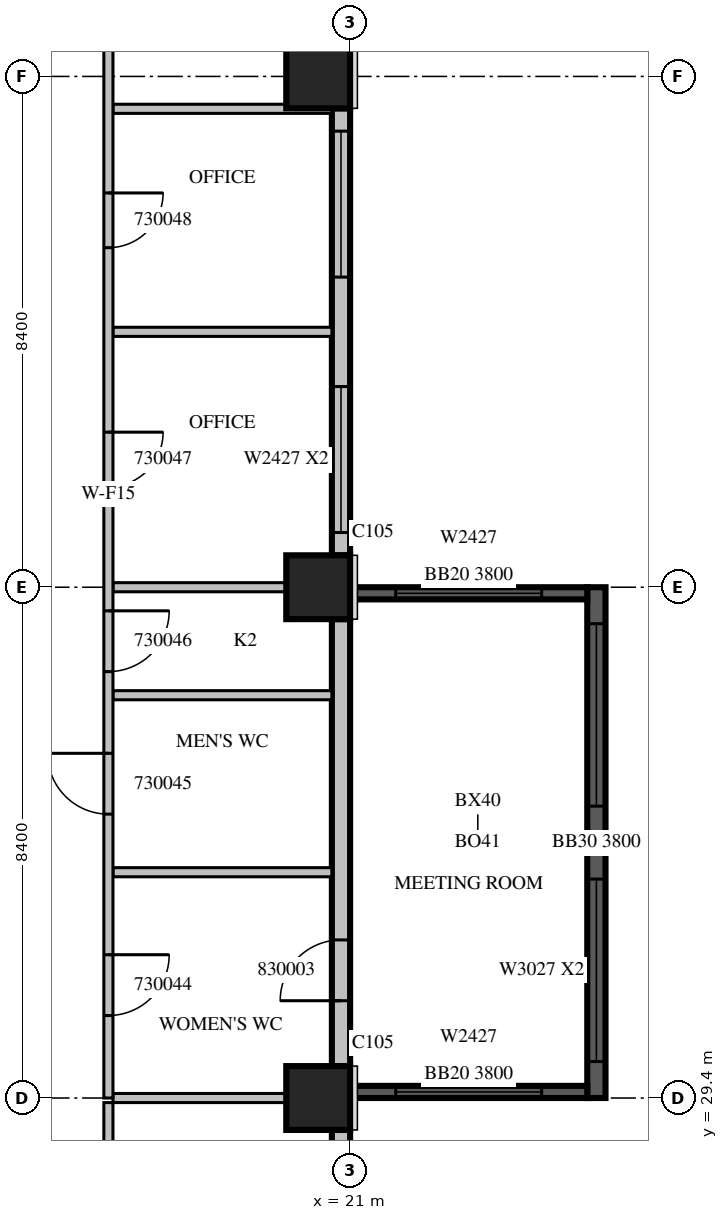
"""IFC4 building model, lengths in metres.
Left out: names, types, materials, properties, quantities, classifications, styles, units other than length and angle.
Written with IfcOpenShell. Run it as: python <this file> out.ifc"""

import sys

from ifc_helpers import new_model, si_unit, direction, frame, frame_2d, origin, origin_2d, place, context, subcontext, project, spatial, rectangle, extrude, source, transform, mapped, element, fill, save


model = new_model("IFC4")
c1 = context("Model", 3, precision=1e-05, world=origin(), true_north=direction((0.0, 1.0)))
c2 = subcontext(c1, "Body", "Model", "MODEL_VIEW")
j1 = project(units=[si_unit("LENGTHUNIT", "METRE"), si_unit("PLANEANGLEUNIT", "RADIAN")], contexts=[c1])
p1 = place(None, origin())
s1 = spatial("IfcSite", under=j1, at=p1, CompositionType="ELEMENT")
p2 = place(p1, origin())
s2 = spatial("IfcBuilding", under=s1, at=p2, CompositionType="ELEMENT")
p3 = place(p2, frame((0.0, 0.0, 137.1)))
s3 = spatial("IfcBuildingStorey", under=s2, at=p3, CompositionType="ELEMENT", Elevation=137.1)
m1 = source(origin(), c2, "Body", "SweptSolid", [
    extrude(rectangle(XDim=1.05, YDim=1.05, at=origin_2d()), origin(), (0.0, 0.0, 1.0), 4.2),
])
for number, where, z_axis, x_axis in (
    (1, (20.475, 29.4, 0.0), (0.0, 0.0, 1.0), (1.0, 0.0, 0.0)),
    (2, (20.475, 37.8, 0.0), (0.0, 0.0, 1.0), (1.0, 0.0, 0.0)),
    (3, (20.475, 46.2, 0.0), (0.0, 0.0, 1.0), (1.0, 0.0, 0.0)),
):
    element("IfcColumn", number, at=place(p3, frame(where, z_axis=z_axis, x_axis=x_axis)), inside=s3, PredefinedType="COLUMN", context=c2, shape_type="MappedRepresentation", body=[
        mapped(m1, transform((0.0, 0.0, 0.0), scale=1.0)),
    ])
m2 = source(origin(), c2, "Body", "SweptSolid", [
    extrude(rectangle(XDim=8.4, YDim=0.3, at=frame_2d((4.2, 0.0))), origin(), (0.0, 0.0, 1.0), 3.8),
])
p4 = place(p3, frame((25.05, 29.4, 0.0), z_axis=(0.0, 0.0, 1.0), x_axis=(0.0, 1.0, 0.0)))
e4 = element("IfcWall", 4, at=p4, inside=s3, PredefinedType="SOLIDWALL", context=c2, shape_type="MappedRepresentation", body=[
    mapped(m2, transform((0.0, 0.0, 0.0), scale=1.0)),
])
m3 = source(origin(), c2, "Body", "SweptSolid", [
    extrude(rectangle(XDim=3.0, YDim=2.7, at=frame_2d((1.5, 1.35))), frame((0.0, 0.16, 0.0), z_axis=(0.0, -1.0, 0.0), x_axis=(1.0, 0.0, 0.0)), (0.0, 0.0, 1.0), 0.32),
])
p5 = place(p4, frame((0.6, 0.0, 0.6)))
e5 = element("IfcOpeningElement", 5, at=p5, cuts=e4, PredefinedType="OPENING", context=c2, shape_type="MappedRepresentation", body=[
    mapped(m3, transform((0.0, 0.0, 0.0), scale=1.0)),
])
p6 = place(p4, frame((4.8, 0.0, 0.6)))
e6 = element("IfcOpeningElement", 6, at=p6, cuts=e4, PredefinedType="OPENING", context=c2, shape_type="MappedRepresentation", body=[
    mapped(m3, transform((0.0, 0.0, 0.0), scale=1.0)),
])
m4 = source(origin(), c2, "Body", "SweptSolid", [
    extrude(rectangle(XDim=3.9, YDim=0.2, at=frame_2d((1.95, 0.0))), origin(), (0.0, 0.0, 1.0), 3.8),
])
p7 = place(p3, frame((21.0, 29.5, 0.0), z_axis=(0.0, 0.0, 1.0), x_axis=(1.0, 0.0, 0.0)))
e7 = element("IfcWall", 7, at=p7, inside=s3, PredefinedType="SOLIDWALL", context=c2, shape_type="MappedRepresentation", body=[
    mapped(m4, transform((0.0, 0.0, 0.0), scale=1.0)),
])
m5 = source(origin(), c2, "Body", "SweptSolid", [
    extrude(rectangle(XDim=2.4, YDim=2.7, at=frame_2d((1.2, 1.35))), frame((0.0, 0.11, 0.0), z_axis=(0.0, -1.0, 0.0), x_axis=(1.0, 0.0, 0.0)), (0.0, 0.0, 1.0), 0.22),
])
p8 = place(p7, frame((0.75, 0.0, 0.6)))
e8 = element("IfcOpeningElement", 8, at=p8, cuts=e7, PredefinedType="OPENING", context=c2, shape_type="MappedRepresentation", body=[
    mapped(m5, transform((0.0, 0.0, 0.0), scale=1.0)),
])
p9 = place(p3, frame((21.0, 37.7, 0.0), z_axis=(0.0, 0.0, 1.0), x_axis=(1.0, 0.0, 0.0)))
e9 = element("IfcWall", 9, at=p9, inside=s3, PredefinedType="SOLIDWALL", context=c2, shape_type="MappedRepresentation", body=[
    mapped(m4, transform((0.0, 0.0, 0.0), scale=1.0)),
])
p10 = place(p9, frame((0.75, 0.0, 0.6)))
e10 = element("IfcOpeningElement", 10, at=p10, cuts=e9, PredefinedType="OPENING", context=c2, shape_type="MappedRepresentation", body=[
    mapped(m5, transform((0.0, 0.0, 0.0), scale=1.0)),
])
m6 = source(origin(), c2, "Body", "SweptSolid", [
    extrude(rectangle(XDim=6.875, YDim=0.3, at=frame_2d((3.438, 0.0))), origin(), (0.0, 0.0, 1.0), 3.8),
])
p11 = place(p3, frame((20.85, 22.0, 0.0), z_axis=(0.0, 0.0, 1.0), x_axis=(0.0, 1.0, 0.0)))
e11 = element("IfcWall", 11, at=p11, inside=s3, PredefinedType="STANDARD", context=c2, shape_type="MappedRepresentation", body=[
    mapped(m6, transform((0.0, 0.0, 0.0), scale=1.0)),
])
m7 = source(origin(), c2, "Body", "SweptSolid", [
    extrude(rectangle(XDim=1.8, YDim=2.7, at=frame_2d((0.9, 1.35))), frame((0.0, 0.16, 0.0), z_axis=(0.0, -1.0, 0.0), x_axis=(1.0, 0.0, 0.0)), (0.0, 0.0, 1.0), 0.32),
])
p12 = place(p11, frame((0.2, 0.0, 0.6)))
e12 = element("IfcOpeningElement", 12, at=p12, cuts=e11, PredefinedType="OPENING", context=c2, shape_type="MappedRepresentation", body=[
    mapped(m7, transform((0.0, 0.0, 0.0), scale=1.0)),
])
p13 = place(p11, frame((4.537, 0.0, 0.6)))
e13 = element("IfcOpeningElement", 13, at=p13, cuts=e11, PredefinedType="OPENING", context=c2, shape_type="MappedRepresentation", body=[
    mapped(m7, transform((0.0, 0.0, 0.0), scale=1.0)),
])
m8 = source(origin(), c2, "Body", "SweptSolid", [
    extrude(rectangle(XDim=7.35, YDim=0.3, at=frame_2d((3.675, 0.0))), origin(), (0.0, 0.0, 1.0), 3.8),
])
p14 = place(p3, frame((20.85, 29.925, 0.0), z_axis=(0.0, 0.0, 1.0), x_axis=(0.0, 1.0, 0.0)))
e14 = element("IfcWall", 14, at=p14, inside=s3, PredefinedType="STANDARD", context=c2, shape_type="MappedRepresentation", body=[
    mapped(m8, transform((0.0, 0.0, 0.0), scale=1.0)),
])
m9 = source(origin(), c2, "Body", "SweptSolid", [
    extrude(rectangle(XDim=1.0, YDim=2.1, at=frame_2d((0.5, 1.05))), frame((0.0, 0.16, 0.0), z_axis=(0.0, -1.0, 0.0), x_axis=(1.0, 0.0, 0.0)), (0.0, 0.0, 1.0), 0.32),
])
p15 = place(p14, frame((1.075, 0.0, 0.0)))
e15 = element("IfcOpeningElement", 15, at=p15, cuts=e14, PredefinedType="OPENING", context=c2, shape_type="MappedRepresentation", body=[
    mapped(m9, transform((0.0, 0.0, 0.0), scale=1.0)),
])
p16 = place(p3, frame((20.85, 38.325, 0.0), z_axis=(0.0, 0.0, 1.0), x_axis=(0.0, 1.0, 0.0)))
e16 = element("IfcWall", 16, at=p16, inside=s3, PredefinedType="STANDARD", context=c2, shape_type="MappedRepresentation", body=[
    mapped(m8, transform((0.0, 0.0, 0.0), scale=1.0)),
])
m10 = source(origin(), c2, "Body", "SweptSolid", [
    extrude(rectangle(XDim=2.4, YDim=2.7, at=frame_2d((1.2, 1.35))), frame((0.0, 0.16, 0.0), z_axis=(0.0, -1.0, 0.0), x_axis=(1.0, 0.0, 0.0)), (0.0, 0.0, 1.0), 0.32),
])
p17 = place(p16, frame((0.375, 0.0, 0.6)))
e17 = element("IfcOpeningElement", 17, at=p17, cuts=e16, PredefinedType="OPENING", context=c2, shape_type="MappedRepresentation", body=[
    mapped(m10, transform((0.0, 0.0, 0.0), scale=1.0)),
])
p18 = place(p16, frame((4.575, 0.0, 0.6)))
e18 = element("IfcOpeningElement", 18, at=p18, cuts=e16, PredefinedType="OPENING", context=c2, shape_type="MappedRepresentation", body=[
    mapped(m10, transform((0.0, 0.0, 0.0), scale=1.0)),
])
m11 = source(origin(), c2, "Body", "SweptSolid", [
    extrude(rectangle(XDim=3.05, YDim=0.15, at=frame_2d((1.525, 0.0))), origin(), (0.0, 0.0, 1.0), 3.8),
])
p19 = place(p3, frame((17.025, 29.325, 0.0), z_axis=(0.0, 0.0, 1.0), x_axis=(0.0, -1.0, 0.0)))
e19 = element("IfcWall", 19, at=p19, inside=s3, PredefinedType="PARTITIONING", context=c2, shape_type="MappedRepresentation", body=[
    mapped(m11, transform((0.0, 0.0, 0.0), scale=1.0)),
])
m12 = source(origin(), c2, "Body", "SweptSolid", [
    extrude(rectangle(XDim=2.851, YDim=0.15, at=frame_2d((1.425, 0.0))), origin(), (0.0, 0.0, 1.0), 3.8),
])
p20 = place(p3, frame((19.951, 29.4, 0.0), z_axis=(0.0, 0.0, 1.0), x_axis=(-1.0, 0.0, 0.0)))
e20 = element("IfcWall", 20, at=p20, inside=s3, PredefinedType="PARTITIONING", context=c2, shape_type="MappedRepresentation", body=[
    mapped(m12, transform((0.0, 0.0, 0.0), scale=1.0)),
])
m13 = source(origin(), c2, "Body", "SweptSolid", [
    extrude(rectangle(XDim=3.6, YDim=0.15, at=frame_2d((1.8, 0.0))), origin(), (0.0, 0.0, 1.0), 3.8),
])
for number, where, z_axis, x_axis in (
    (21, (17.1, 33.113, 0.0), (0.0, 0.0, 1.0), (1.0, 0.0, 0.0)),
    (22, (17.1, 36.024, 0.0), (0.0, 0.0, 1.0), (1.0, 0.0, 0.0)),
    (23, (17.1, 45.667, 0.0), (0.0, 0.0, 1.0), (1.0, 0.0, 0.0)),
):
    element("IfcWall", number, at=place(p3, frame(where, z_axis=z_axis, x_axis=x_axis)), inside=s3, PredefinedType="PARTITIONING", context=c2, shape_type="MappedRepresentation", body=[
        mapped(m13, transform((0.0, 0.0, 0.0), scale=1.0)),
    ])
p21 = place(p3, frame((19.951, 37.8, 0.0), z_axis=(0.0, 0.0, 1.0), x_axis=(-1.0, 0.0, 0.0)))
e24 = element("IfcWall", 24, at=p21, inside=s3, PredefinedType="PARTITIONING", context=c2, shape_type="MappedRepresentation", body=[
    mapped(m12, transform((0.0, 0.0, 0.0), scale=1.0)),
])
p22 = place(p3, frame((20.7, 42.0, 0.0), z_axis=(0.0, 0.0, 1.0), x_axis=(-1.0, 0.0, 0.0)))
e25 = element("IfcWall", 25, at=p22, inside=s3, PredefinedType="PARTITIONING", context=c2, shape_type="MappedRepresentation", body=[
    mapped(m13, transform((0.0, 0.0, 0.0), scale=1.0)),
])
m14 = source(origin(), c2, "Body", "SweptSolid", [
    extrude(rectangle(XDim=19.86, YDim=0.15, at=frame_2d((9.93, 0.0))), origin(), (0.0, 0.0, 1.0), 3.8),
])
p23 = place(p3, frame((17.025, 49.26, 0.0), z_axis=(0.0, 0.0, 1.0), x_axis=(0.0, -1.0, 0.0)))
e26 = element("IfcWall", 26, at=p23, inside=s3, PredefinedType="PARTITIONING", context=c2, shape_type="MappedRepresentation", body=[
    mapped(m14, transform((0.0, 0.0, 0.0), scale=1.0)),
])
m15 = source(origin(), c2, "Body", "SweptSolid", [
    extrude(rectangle(XDim=1.0, YDim=2.1, at=frame_2d((0.5, 1.05))), frame((0.0, 0.085, 0.0), z_axis=(0.0, -1.0, 0.0), x_axis=(1.0, 0.0, 0.0)), (0.0, 0.0, 1.0), 0.17),
])
p24 = place(p23, frame((17.503, 0.0, 0.0)))
e27 = element("IfcOpeningElement", 27, at=p24, cuts=e26, PredefinedType="OPENING", context=c2, shape_type="MappedRepresentation", body=[
    mapped(m15, transform((0.0, 0.0, 0.0), scale=1.0)),
])
p25 = place(p23, frame((14.191, 0.0, 0.0)))
e28 = element("IfcOpeningElement", 28, at=p25, cuts=e26, PredefinedType="OPENING", context=c2, shape_type="MappedRepresentation", body=[
    mapped(m15, transform((0.0, 0.0, 0.0), scale=1.0)),
])
p26 = place(p23, frame((11.848, 0.0, 0.0)))
e29 = element("IfcOpeningElement", 29, at=p26, cuts=e26, PredefinedType="OPENING", context=c2, shape_type="MappedRepresentation", body=[
    mapped(m15, transform((0.0, 0.0, 0.0), scale=1.0)),
])
m16 = source(origin(), c2, "Body", "SweptSolid", [
    extrude(rectangle(XDim=0.9, YDim=2.1, at=frame_2d((0.45, 1.05))), frame((0.0, 0.085, 0.0), z_axis=(0.0, -1.0, 0.0), x_axis=(1.0, 0.0, 0.0)), (0.0, 0.0, 1.0), 0.17),
])
p27 = place(p23, frame((8.91, 0.0, 0.0)))
e30 = element("IfcOpeningElement", 30, at=p27, cuts=e26, PredefinedType="OPENING", context=c2, shape_type="MappedRepresentation", body=[
    mapped(m16, transform((0.0, 0.0, 0.0), scale=1.0)),
])
p28 = place(p23, frame((4.976, 0.0, 0.0)))
e31 = element("IfcOpeningElement", 31, at=p28, cuts=e26, PredefinedType="OPENING", context=c2, shape_type="MappedRepresentation", body=[
    mapped(m16, transform((0.0, 0.0, 0.0), scale=1.0)),
])
p29 = place(p23, frame((1.309, 0.0, 0.0)))
e32 = element("IfcOpeningElement", 32, at=p29, cuts=e26, PredefinedType="OPENING", context=c2, shape_type="MappedRepresentation", body=[
    mapped(m16, transform((0.0, 0.0, 0.0), scale=1.0)),
])
m17 = source(origin(), c2, "Body", "SweptSolid", [
    extrude(rectangle(XDim=3.0, YDim=2.7, at=frame_2d((1.5, 1.35))), frame((0.0, 0.03, 0.0), z_axis=(0.0, -1.0, 0.0), x_axis=(1.0, 0.0, 0.0)), (0.0, 0.0, 1.0), 0.06),
])
p30 = place(p5, origin())
e33 = element("IfcWindow", 33, at=p30, inside=s3, PartitioningType="SINGLE_PANEL", PredefinedType="WINDOW", context=c2, shape_type="MappedRepresentation", body=[
    mapped(m17, transform((0.0, 0.0, 0.0), scale=1.0)),
])
fill(e5, e33)
p31 = place(p6, origin())
e34 = element("IfcWindow", 34, at=p31, inside=s3, PartitioningType="SINGLE_PANEL", PredefinedType="WINDOW", context=c2, shape_type="MappedRepresentation", body=[
    mapped(m17, transform((0.0, 0.0, 0.0), scale=1.0)),
])
fill(e6, e34)
m18 = source(origin(), c2, "Body", "SweptSolid", [
    extrude(rectangle(XDim=2.4, YDim=2.7, at=frame_2d((1.2, 1.35))), frame((0.0, 0.03, 0.0), z_axis=(0.0, -1.0, 0.0), x_axis=(1.0, 0.0, 0.0)), (0.0, 0.0, 1.0), 0.06),
])
p32 = place(p8, origin())
e35 = element("IfcWindow", 35, at=p32, inside=s3, PartitioningType="SINGLE_PANEL", PredefinedType="WINDOW", context=c2, shape_type="MappedRepresentation", body=[
    mapped(m18, transform((0.0, 0.0, 0.0), scale=1.0)),
])
fill(e8, e35)
p33 = place(p10, origin())
e36 = element("IfcWindow", 36, at=p33, inside=s3, PartitioningType="SINGLE_PANEL", PredefinedType="WINDOW", context=c2, shape_type="MappedRepresentation", body=[
    mapped(m18, transform((0.0, 0.0, 0.0), scale=1.0)),
])
fill(e10, e36)
p34 = place(p17, origin())
e37 = element("IfcWindow", 37, at=p34, inside=s3, PartitioningType="SINGLE_PANEL", PredefinedType="WINDOW", context=c2, shape_type="MappedRepresentation", body=[
    mapped(m18, transform((0.0, 0.0, 0.0), scale=1.0)),
])
fill(e17, e37)
p35 = place(p18, origin())
e38 = element("IfcWindow", 38, at=p35, inside=s3, PartitioningType="SINGLE_PANEL", PredefinedType="WINDOW", context=c2, shape_type="MappedRepresentation", body=[
    mapped(m18, transform((0.0, 0.0, 0.0), scale=1.0)),
])
fill(e18, e38)
m19 = source(origin(), c2, "Body", "SweptSolid", [
    extrude(rectangle(XDim=1.0, YDim=2.1, at=frame_2d((0.5, 1.05))), frame((0.0, 0.025, 0.0), z_axis=(0.0, -1.0, 0.0), x_axis=(1.0, 0.0, 0.0)), (0.0, 0.0, 1.0), 0.05),
])
p36 = place(p24, origin())
e39 = element("IfcDoor", 39, at=p36, inside=s3, OperationType="SINGLE_SWING_LEFT", PredefinedType="DOOR", context=c2, shape_type="MappedRepresentation", body=[
    mapped(m19, transform((0.0, 0.0, 0.0), scale=1.0)),
])
fill(e27, e39)
p37 = place(p25, origin())
e40 = element("IfcDoor", 40, at=p37, inside=s3, OperationType="SINGLE_SWING_RIGHT", PredefinedType="DOOR", context=c2, shape_type="MappedRepresentation", body=[
    mapped(m19, transform((0.0, 0.0, 0.0), scale=1.0)),
])
fill(e28, e40)
p38 = place(p26, origin())
e41 = element("IfcDoor", 41, at=p38, inside=s3, OperationType="SINGLE_SWING_LEFT", PredefinedType="DOOR", context=c2, shape_type="MappedRepresentation", body=[
    mapped(m19, transform((0.0, 0.0, 0.0), scale=1.0)),
])
fill(e29, e41)
m20 = source(origin(), c2, "Body", "SweptSolid", [
    extrude(rectangle(XDim=0.9, YDim=2.1, at=frame_2d((0.45, 1.05))), frame((0.0, 0.025, 0.0), z_axis=(0.0, -1.0, 0.0), x_axis=(1.0, 0.0, 0.0)), (0.0, 0.0, 1.0), 0.05),
])
p39 = place(p27, origin())
e42 = element("IfcDoor", 42, at=p39, inside=s3, OperationType="SINGLE_SWING_LEFT", PredefinedType="DOOR", context=c2, shape_type="MappedRepresentation", body=[
    mapped(m20, transform((0.0, 0.0, 0.0), scale=1.0)),
])
fill(e30, e42)
p40 = place(p28, origin())
e43 = element("IfcDoor", 43, at=p40, inside=s3, OperationType="SINGLE_SWING_LEFT", PredefinedType="DOOR", context=c2, shape_type="MappedRepresentation", body=[
    mapped(m20, transform((0.0, 0.0, 0.0), scale=1.0)),
])
fill(e31, e43)
p41 = place(p15, origin())
e44 = element("IfcDoor", 44, at=p41, inside=s3, OperationType="SINGLE_SWING_LEFT", PredefinedType="DOOR", context=c2, shape_type="MappedRepresentation", body=[
    mapped(m19, transform((0.0, 0.0, 0.0), scale=1.0)),
])
fill(e15, e44)
save(model, sys.argv[1])
